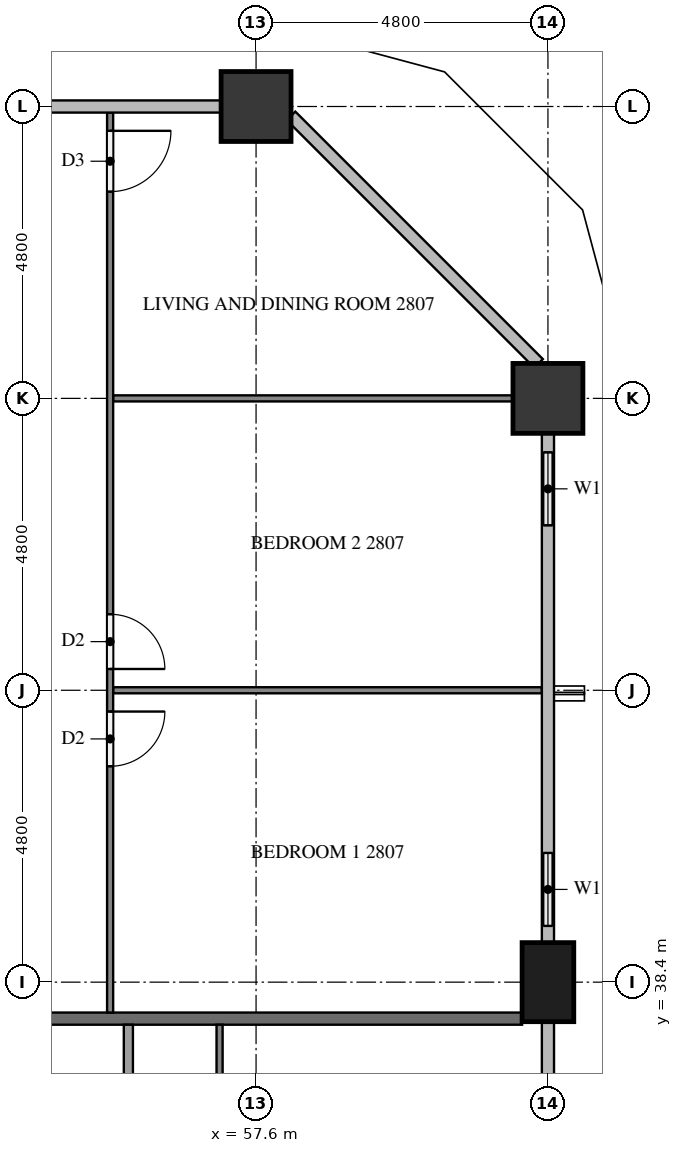
"""IFC4 building model, lengths in metres.
Left out: names, types, materials, properties, quantities, classifications, styles, units other than length and angle.
Written with IfcOpenShell. Run it as: python <this file> out.ifc"""

import sys

from ifc_helpers import new_model, si_unit, direction, frame, frame_2d, origin, origin_2d, place, context, subcontext, project, spatial, rectangle, extrude, element, fill, save


model = new_model("IFC4")
c1 = context("Model", 3, precision=1e-05, world=origin(), true_north=direction((0.0, 1.0)))
c2 = subcontext(c1, "Body", "Model", "MODEL_VIEW")
j1 = project(units=[si_unit("LENGTHUNIT", "METRE"), si_unit("PLANEANGLEUNIT", "RADIAN")], contexts=[c1])
p1 = place(None, origin())
s1 = spatial("IfcSite", under=j1, at=p1, CompositionType="ELEMENT")
p2 = place(p1, origin())
s2 = spatial("IfcBuilding", under=s1, at=p2, CompositionType="ELEMENT")
p3 = place(p2, frame((0.0, 0.0, 110.2)))
s3 = spatial("IfcBuildingStorey", under=s2, at=p3, CompositionType="ELEMENT", Elevation=110.2)
p4 = place(p3, frame((62.4, 38.4, 0.0), z_axis=(0.0, 0.0, 1.0), x_axis=(0.0, 1.0, 0.0)))
e1 = element("IfcColumn", 1, at=p4, inside=s3, PredefinedType="COLUMN", context=c2, shape_type="SweptSolid", body=[
    extrude(rectangle(XDim=1.3, YDim=0.85, at=origin_2d()), origin(), (0.0, 0.0, 1.0), 3.1),
])
for number, where, z_axis, x_axis in (
    (2, (62.4, 48.0, 0.0), (0.0, 0.0, 1.0), (1.0, 0.0, 0.0)),
    (3, (57.6, 52.8, 0.0), (0.0, 0.0, 1.0), (1.0, 0.0, 0.0)),
):
    element("IfcColumn", number, at=place(p3, frame(where, z_axis=z_axis, x_axis=x_axis)), inside=s3, PredefinedType="COLUMN", context=c2, shape_type="SweptSolid", body=[
        extrude(rectangle(XDim=1.15, YDim=1.15, at=origin_2d()), origin(), (0.0, 0.0, 1.0), 3.1),
    ])
p5 = place(p3, frame((62.4, 39.05, 0.0), z_axis=(0.0, 0.0, 1.0), x_axis=(0.0, 1.0, 0.0)))
e4 = element("IfcWall", 4, at=p5, inside=s3, PredefinedType="SOLIDWALL", context=c2, shape_type="SweptSolid", body=[
    extrude(rectangle(XDim=1.75, YDim=0.15, at=frame_2d((0.875, 0.0))), origin(), (0.0, 0.0, 1.0), 3.1),
])
p6 = place(p5, frame((0.275, 0.0, 0.9)))
e5 = element("IfcOpeningElement", 5, at=p6, cuts=e4, PredefinedType="OPENING", context=c2, shape_type="SweptSolid", body=[
    extrude(rectangle(XDim=1.2, YDim=1.4, at=frame_2d((0.6, 0.7))), frame((0.0, 0.085, 0.0), z_axis=(0.0, -1.0, 0.0), x_axis=(1.0, 0.0, 0.0)), (0.0, 0.0, 1.0), 0.17),
])
p7 = place(p3, frame((62.4, 45.6, 0.0), z_axis=(0.0, 0.0, 1.0), x_axis=(0.0, 1.0, 0.0)))
e6 = element("IfcWall", 6, at=p7, inside=s3, PredefinedType="SOLIDWALL", context=c2, shape_type="SweptSolid", body=[
    extrude(rectangle(XDim=1.825, YDim=0.15, at=frame_2d((0.913, 0.0))), origin(), (0.0, 0.0, 1.0), 3.1),
])
p8 = place(p7, frame((0.312, 0.0, 0.9)))
e7 = element("IfcOpeningElement", 7, at=p8, cuts=e6, PredefinedType="OPENING", context=c2, shape_type="SweptSolid", body=[
    extrude(rectangle(XDim=1.2, YDim=1.4, at=frame_2d((0.6, 0.7))), frame((0.0, 0.085, 0.0), z_axis=(0.0, -1.0, 0.0), x_axis=(1.0, 0.0, 0.0)), (0.0, 0.0, 1.0), 0.17),
])
p9 = place(p3, frame((52.5, 37.8, 0.0), z_axis=(0.0, 0.0, 1.0), x_axis=(1.0, 0.0, 0.0)))
e8 = element("IfcWall", 8, at=p9, inside=s3, PredefinedType="PARTITIONING", context=c2, shape_type="SweptSolid", body=[
    extrude(rectangle(XDim=9.475, YDim=0.2, at=frame_2d((4.738, 0.0))), origin(), (0.0, 0.0, 1.0), 3.1),
])
p10 = place(p3, frame((57.0, 37.7, 0.0), z_axis=(0.0, 0.0, 1.0), x_axis=(0.0, -1.0, 0.0)))
e9 = element("IfcWall", 9, at=p10, inside=s3, PredefinedType="PARTITIONING", context=c2, shape_type="SweptSolid", body=[
    extrude(rectangle(XDim=11.2, YDim=0.1, at=frame_2d((5.6, 0.0))), origin(), (0.0, 0.0, 1.0), 3.1),
])
p11 = place(p10, frame((6.85, 0.0, 0.0)))
e10 = element("IfcOpeningElement", 10, at=p11, cuts=e9, PredefinedType="OPENING", context=c2, shape_type="SweptSolid", body=[
    extrude(rectangle(XDim=0.9, YDim=2.1, at=frame_2d((0.45, 1.05))), frame((0.0, 0.06, 0.0), z_axis=(0.0, -1.0, 0.0), x_axis=(1.0, 0.0, 0.0)), (0.0, 0.0, 1.0), 0.12),
])
p12 = place(p10, frame((5.15, 0.0, 0.0)))
e11 = element("IfcOpeningElement", 11, at=p12, cuts=e9, PredefinedType="OPENING", context=c2, shape_type="SweptSolid", body=[
    extrude(rectangle(XDim=1.0, YDim=2.1, at=frame_2d((0.5, 1.05))), frame((0.0, 0.06, 0.0), z_axis=(0.0, -1.0, 0.0), x_axis=(1.0, 0.0, 0.0)), (0.0, 0.0, 1.0), 0.12),
])
p13 = place(p3, frame((55.5, 28.275, 0.0), z_axis=(0.0, 0.0, 1.0), x_axis=(0.0, 1.0, 0.0)))
e12 = element("IfcWall", 12, at=p13, inside=s3, PredefinedType="PARTITIONING", context=c2, shape_type="SweptSolid", body=[
    extrude(rectangle(XDim=9.425, YDim=0.15, at=frame_2d((4.712, 0.0))), origin(), (0.0, 0.0, 1.0), 3.1),
])
p14 = place(p13, frame((4.43, 0.0, 0.0)))
e13 = element("IfcOpeningElement", 13, at=p14, cuts=e12, PredefinedType="OPENING", context=c2, shape_type="SweptSolid", body=[
    extrude(rectangle(XDim=0.9, YDim=2.1, at=frame_2d((0.45, 1.05))), frame((0.0, 0.085, 0.0), z_axis=(0.0, -1.0, 0.0), x_axis=(1.0, 0.0, 0.0)), (0.0, 0.0, 1.0), 0.17),
])
p15 = place(p13, frame((5.98, 0.0, 0.0)))
e14 = element("IfcOpeningElement", 14, at=p15, cuts=e12, PredefinedType="OPENING", context=c2, shape_type="SweptSolid", body=[
    extrude(rectangle(XDim=0.8, YDim=2.1, at=frame_2d((0.4, 1.05))), frame((0.0, 0.085, 0.0), z_axis=(0.0, -1.0, 0.0), x_axis=(1.0, 0.0, 0.0)), (0.0, 0.0, 1.0), 0.17),
])
p16 = place(p3, frame((55.25, 43.2, 0.0), z_axis=(0.0, 0.0, 1.0), x_axis=(1.0, 0.0, 0.0)))
e15 = element("IfcWall", 15, at=p16, inside=s3, PredefinedType="PARTITIONING", context=c2, shape_type="SweptSolid", body=[
    extrude(rectangle(XDim=7.05, YDim=0.1, at=frame_2d((3.525, 0.0))), origin(), (0.0, 0.0, 1.0), 3.1),
])
p17 = place(p3, frame((55.25, 48.0, 0.0), z_axis=(0.0, 0.0, 1.0), x_axis=(1.0, 0.0, 0.0)))
e16 = element("IfcWall", 16, at=p17, inside=s3, PredefinedType="PARTITIONING", context=c2, shape_type="SweptSolid", body=[
    extrude(rectangle(XDim=6.575, YDim=0.1, at=frame_2d((3.288, 0.0))), origin(), (0.0, 0.0, 1.0), 3.1),
])
p18 = place(p3, frame((55.2, 52.7, 0.0), z_axis=(0.0, 0.0, 1.0), x_axis=(0.0, -1.0, 0.0)))
e17 = element("IfcWall", 17, at=p18, inside=s3, PredefinedType="PARTITIONING", context=c2, shape_type="SweptSolid", body=[
    extrude(rectangle(XDim=14.8, YDim=0.1, at=frame_2d((7.4, 0.0))), origin(), (0.0, 0.0, 1.0), 3.1),
])
p19 = place(p18, frame((9.85, 0.0, 0.0)))
e18 = element("IfcOpeningElement", 18, at=p19, cuts=e17, PredefinedType="OPENING", context=c2, shape_type="SweptSolid", body=[
    extrude(rectangle(XDim=0.9, YDim=2.1, at=frame_2d((0.45, 1.05))), frame((0.0, 0.06, 0.0), z_axis=(0.0, -1.0, 0.0), x_axis=(1.0, 0.0, 0.0)), (0.0, 0.0, 1.0), 0.12),
])
p20 = place(p18, frame((8.25, 0.0, 0.0)))
e19 = element("IfcOpeningElement", 19, at=p20, cuts=e17, PredefinedType="OPENING", context=c2, shape_type="SweptSolid", body=[
    extrude(rectangle(XDim=0.9, YDim=2.1, at=frame_2d((0.45, 1.05))), frame((0.0, 0.06, 0.0), z_axis=(0.0, -1.0, 0.0), x_axis=(1.0, 0.0, 0.0)), (0.0, 0.0, 1.0), 0.12),
])
p21 = place(p18, frame((0.3, 0.0, 0.0)))
e20 = element("IfcOpeningElement", 20, at=p21, cuts=e17, PredefinedType="OPENING", context=c2, shape_type="SweptSolid", body=[
    extrude(rectangle(XDim=1.0, YDim=2.1, at=frame_2d((0.5, 1.05))), frame((0.0, 0.06, 0.0), z_axis=(0.0, -1.0, 0.0), x_axis=(1.0, 0.0, 0.0)), (0.0, 0.0, 1.0), 0.12),
])
p22 = place(p6, origin())
e21 = element("IfcWindow", 21, at=p22, inside=s3, PartitioningType="SINGLE_PANEL", PredefinedType="WINDOW", context=c2, shape_type="SweptSolid", body=[
    extrude(rectangle(XDim=1.2, YDim=1.4, at=frame_2d((0.6, 0.7))), frame((0.0, 0.03, 0.0), z_axis=(0.0, -1.0, 0.0), x_axis=(1.0, 0.0, 0.0)), (0.0, 0.0, 1.0), 0.06),
])
fill(e5, e21)
p23 = place(p8, origin())
e22 = element("IfcWindow", 22, at=p23, inside=s3, PartitioningType="SINGLE_PANEL", PredefinedType="WINDOW", context=c2, shape_type="SweptSolid", body=[
    extrude(rectangle(XDim=1.2, YDim=1.4, at=frame_2d((0.6, 0.7))), frame((0.0, 0.03, 0.0), z_axis=(0.0, -1.0, 0.0), x_axis=(1.0, 0.0, 0.0)), (0.0, 0.0, 1.0), 0.06),
])
fill(e7, e22)
p24 = place(p19, origin())
e23 = element("IfcDoor", 23, at=p24, inside=s3, OperationType="SINGLE_SWING_LEFT", PredefinedType="DOOR", context=c2, shape_type="SweptSolid", body=[
    extrude(rectangle(XDim=0.9, YDim=2.1, at=frame_2d((0.45, 1.05))), frame((0.0, 0.025, 0.0), z_axis=(0.0, -1.0, 0.0), x_axis=(1.0, 0.0, 0.0)), (0.0, 0.0, 1.0), 0.05),
])
fill(e18, e23)
p25 = place(p20, origin())
e24 = element("IfcDoor", 24, at=p25, inside=s3, OperationType="SINGLE_SWING_RIGHT", PredefinedType="DOOR", context=c2, shape_type="SweptSolid", body=[
    extrude(rectangle(XDim=0.9, YDim=2.1, at=frame_2d((0.45, 1.05))), frame((0.0, 0.025, 0.0), z_axis=(0.0, -1.0, 0.0), x_axis=(1.0, 0.0, 0.0)), (0.0, 0.0, 1.0), 0.05),
])
fill(e19, e24)
p26 = place(p21, origin())
e25 = element("IfcDoor", 25, at=p26, inside=s3, OperationType="SINGLE_SWING_LEFT", PredefinedType="DOOR", context=c2, shape_type="SweptSolid", body=[
    extrude(rectangle(XDim=1.0, YDim=2.1, at=frame_2d((0.5, 1.05))), frame((0.0, 0.025, 0.0), z_axis=(0.0, -1.0, 0.0), x_axis=(1.0, 0.0, 0.0)), (0.0, 0.0, 1.0), 0.05),
])
fill(e20, e25)
save(model, sys.argv[1])
